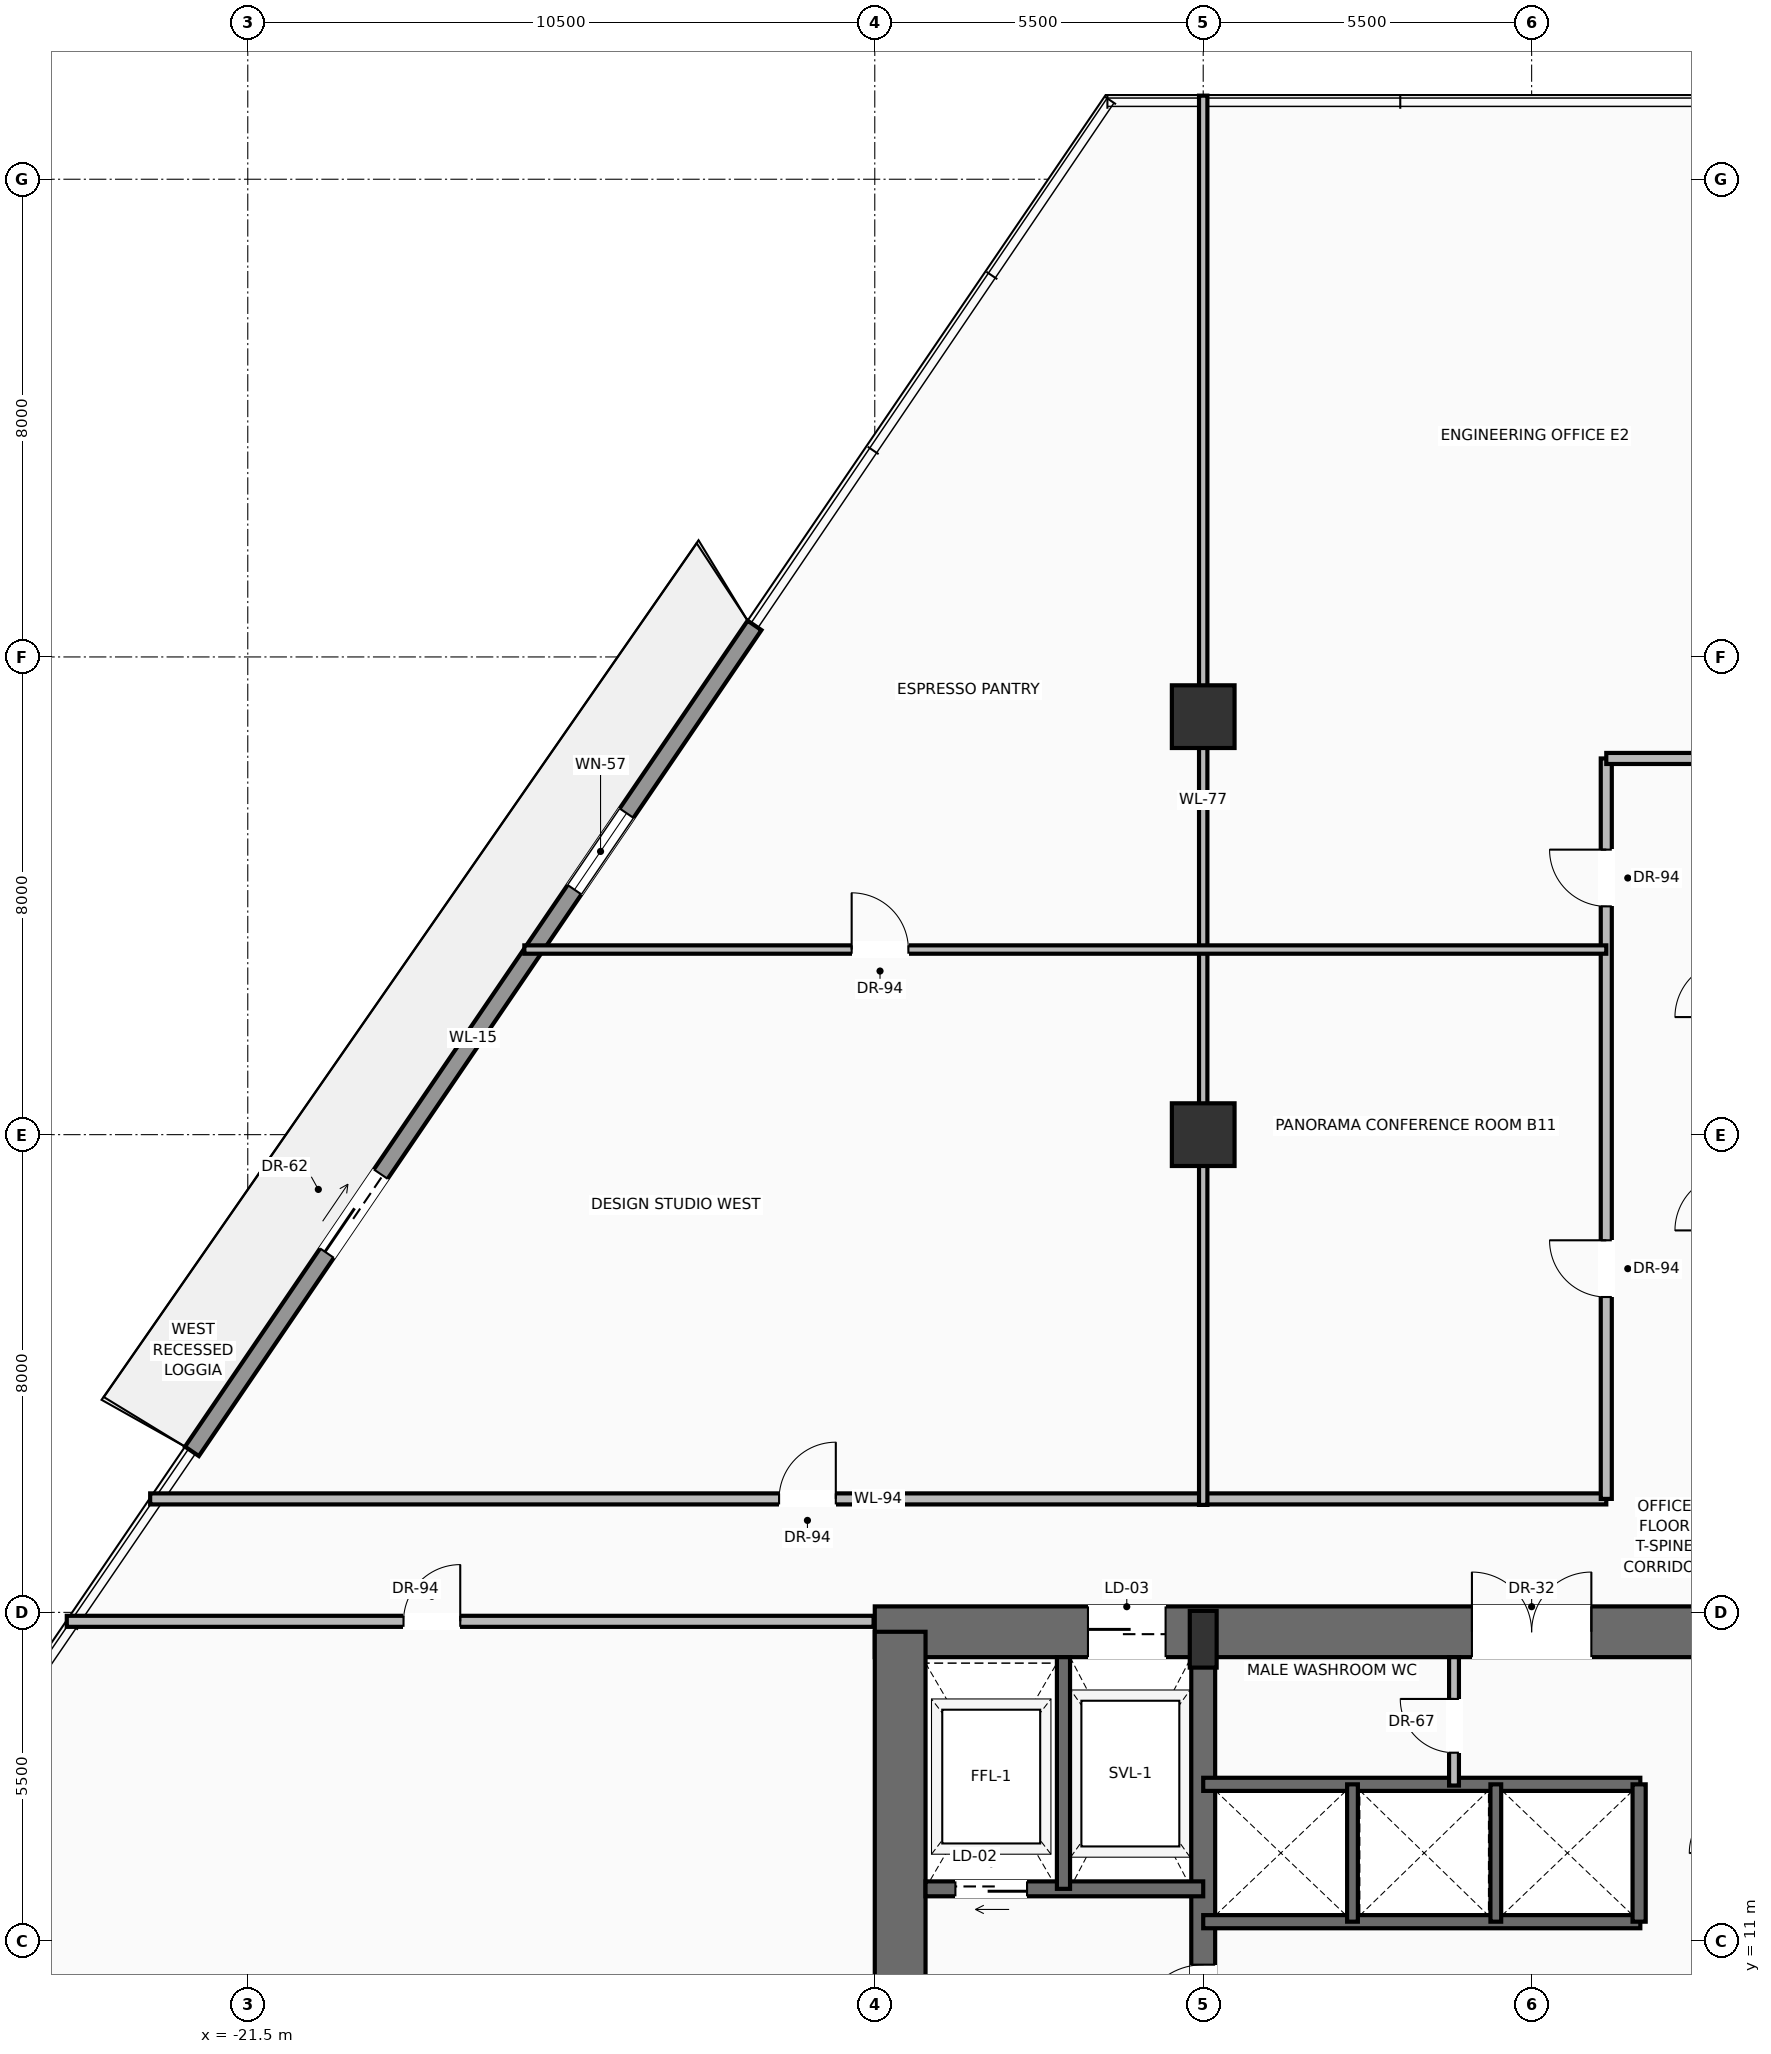
"""IFC4 building model, lengths in metres.
Left out: names, types, materials, properties, quantities, classifications, styles, units other than length and angle.
Written with IfcOpenShell. Run it as: python <this file> out.ifc"""

import sys

from ifc_helpers import new_model, si_unit, direction, frame, frame_2d, origin, origin_2d, place, context, subcontext, project, spatial, rectangle, extrude, source, transform, mapped, element, fill, save


model = new_model("IFC4")
c1 = context("Model", 3, precision=1e-05, world=origin(), true_north=direction((0.0, 1.0)))
c2 = subcontext(c1, "Body", "Model", "MODEL_VIEW")
j1 = project(units=[si_unit("LENGTHUNIT", "METRE"), si_unit("PLANEANGLEUNIT", "RADIAN")], contexts=[c1])
p1 = place(None, origin())
s1 = spatial("IfcSite", under=j1, at=p1, CompositionType="ELEMENT")
p2 = place(p1, origin())
s2 = spatial("IfcBuilding", under=s1, at=p2, CompositionType="ELEMENT")
p3 = place(p2, frame((0.0, 0.0, 49.7)))
s3 = spatial("IfcBuildingStorey", under=s2, at=p3, CompositionType="ELEMENT", Elevation=49.7)
p4 = place(p3, frame((-11.0, 16.175, 0.0), z_axis=(0.0, 0.0, 1.0), x_axis=(1.0, 0.0, 0.0)))
e1 = element("IfcWall", 1, at=p4, inside=s3, PredefinedType="SHEAR", context=c2, shape_type="SweptSolid", body=[
    extrude(rectangle(XDim=22.0, YDim=0.85, at=frame_2d((11.0, 0.0))), origin(), (0.0, 0.0, 1.0), 3.45),
])
p5 = place(p4, frame((3.57, 0.0, 0.0)))
e2 = element("IfcOpeningElement", 2, at=p5, cuts=e1, PredefinedType="OPENING", context=c2, shape_type="SweptSolid", body=[
    extrude(rectangle(XDim=1.3, YDim=2.3, at=frame_2d((0.65, 1.15))), frame((0.0, 0.435, 0.0), z_axis=(0.0, -1.0, 0.0), x_axis=(1.0, 0.0, 0.0)), (0.0, 0.0, 1.0), 0.87),
])
p6 = place(p4, frame((10.0, 0.0, 0.0)))
e3 = element("IfcOpeningElement", 3, at=p6, cuts=e1, PredefinedType="OPENING", context=c2, shape_type="SweptSolid", body=[
    extrude(rectangle(XDim=2.0, YDim=2.4, at=frame_2d((1.0, 1.2))), frame((0.0, 0.435, 0.0), z_axis=(0.0, -1.0, 0.0), x_axis=(1.0, 0.0, 0.0)), (0.0, 0.0, 1.0), 0.87),
])
p7 = place(p3, frame((-10.575, 0.425, 0.0), z_axis=(0.0, 0.0, 1.0), x_axis=(0.0, 1.0, 0.0)))
e4 = element("IfcWall", 4, at=p7, inside=s3, PredefinedType="SHEAR", context=c2, shape_type="SweptSolid", body=[
    extrude(rectangle(XDim=15.75, YDim=0.85, at=frame_2d((7.875, 0.0))), origin(), (0.0, 0.0, 1.0), 3.45),
])
p8 = place(p3, frame((-5.5, 0.425, 0.0), z_axis=(0.0, 0.0, 1.0), x_axis=(0.0, 1.0, 0.0)))
e5 = element("IfcWall", 5, at=p8, inside=s3, PredefinedType="SHEAR", context=c2, shape_type="SweptSolid", body=[
    extrude(rectangle(XDim=15.75, YDim=0.4, at=frame_2d((7.875, 0.0))), origin(), (0.0, 0.0, 1.0), 3.45),
])
p9 = place(p8, frame((9.075, 0.0, 0.0)))
e6 = element("IfcOpeningElement", 6, at=p9, cuts=e5, PredefinedType="OPENING", context=c2, shape_type="SweptSolid", body=[
    extrude(rectangle(XDim=1.1, YDim=2.2, at=frame_2d((0.55, 1.1))), frame((0.0, 0.21, 0.0), z_axis=(0.0, -1.0, 0.0), x_axis=(1.0, 0.0, 0.0)), (0.0, 0.0, 1.0), 0.42),
])
m1 = source(origin(), c2, "Body", "SweptSolid", [
    extrude(rectangle(XDim=0.45, YDim=0.95, at=origin_2d()), origin(), (0.0, 0.0, 1.0), 3.7),
])
p10 = place(p3, frame((-5.5, 16.05, 0.0), z_axis=(0.0, 0.0, 1.0), x_axis=(1.0, 0.0, 0.0)))
e7 = element("IfcColumn", 7, at=p10, inside=s3, PredefinedType="PILASTER", context=c2, shape_type="MappedRepresentation", body=[
    mapped(m1, transform((0.0, 0.0, 0.0), scale=1.0)),
])
m2 = source(origin(), c2, "Body", "SweptSolid", [
    extrude(rectangle(XDim=1.05, YDim=1.05, at=origin_2d()), origin(), (0.0, 0.0, 1.0), 3.7),
])
for number, where, z_axis, x_axis in (
    (8, (-5.5, 24.5, 0.0), (0.0, 0.0, 1.0), (1.0, 0.0, 0.0)),
    (9, (-5.5, 31.5, 0.0), (0.0, 0.0, 1.0), (1.0, 0.0, 0.0)),
):
    element("IfcColumn", number, at=place(p3, frame(where, z_axis=z_axis, x_axis=x_axis)), inside=s3, PredefinedType="COLUMN", context=c2, shape_type="MappedRepresentation", body=[
        mapped(m2, transform((0.0, 0.0, 0.0), scale=1.0)),
    ])
p11 = place(p3, frame((-22.435, 19.197, 0.0), z_axis=(0.0, 0.0, 1.0), x_axis=(0.562920759349, 0.826510870282, 0.0)))
e10 = element("IfcWall", 10, at=p11, inside=s3, PredefinedType="SOLIDWALL", context=c2, shape_type="SweptSolid", body=[
    extrude(rectangle(XDim=16.736, YDim=0.28, at=frame_2d((8.368, 0.0))), origin(), (0.0, 0.0, 1.0), 3.03),
])
p12 = place(p11, frame((4.017, 0.0, 0.0)))
e11 = element("IfcOpeningElement", 11, at=p12, cuts=e10, PredefinedType="OPENING", context=c2, shape_type="SweptSolid", body=[
    extrude(rectangle(XDim=1.6, YDim=2.35, at=frame_2d((0.8, 1.175))), frame((0.0, 0.15, 0.0), z_axis=(0.0, -1.0, 0.0), x_axis=(1.0, 0.0, 0.0)), (0.0, 0.0, 1.0), 0.3),
])
p13 = place(p11, frame((11.38, 0.0, 0.9)))
e12 = element("IfcOpeningElement", 12, at=p13, cuts=e10, PredefinedType="OPENING", context=c2, shape_type="SweptSolid", body=[
    extrude(rectangle(XDim=1.55, YDim=1.85, at=frame_2d((0.775, 0.925))), frame((0.0, 0.15, 0.0), z_axis=(0.0, -1.0, 0.0), x_axis=(1.0, 0.0, 0.0)), (0.0, 0.0, 1.0), 0.3),
])
p14 = place(p3, frame((-5.5, 11.87, 0.0), z_axis=(0.0, 0.0, 1.0), x_axis=(-1.0, 0.0, 0.0)))
e13 = element("IfcWall", 13, at=p14, inside=s3, PredefinedType="SOLIDWALL", context=c2, shape_type="SweptSolid", body=[
    extrude(rectangle(XDim=4.65, YDim=0.25, at=frame_2d((2.325, 0.0))), origin(), (0.0, 0.0, 1.0), 3.45),
])
p15 = place(p14, frame((2.95, 0.0, 0.0)))
e14 = element("IfcOpeningElement", 14, at=p15, cuts=e13, PredefinedType="OPENING", context=c2, shape_type="SweptSolid", body=[
    extrude(rectangle(XDim=1.2, YDim=2.25, at=frame_2d((0.6, 1.125))), frame((0.0, 0.135, 0.0), z_axis=(0.0, -1.0, 0.0), x_axis=(1.0, 0.0, 0.0)), (0.0, 0.0, 1.0), 0.27),
])
p16 = place(p3, frame((-7.84, 11.87, 0.0), z_axis=(0.0, 0.0, 1.0), x_axis=(0.0, 1.0, 0.0)))
e15 = element("IfcWall", 15, at=p16, inside=s3, PredefinedType="SOLIDWALL", context=c2, shape_type="SweptSolid", body=[
    extrude(rectangle(XDim=3.88, YDim=0.22, at=frame_2d((1.94, 0.0))), origin(), (0.0, 0.0, 1.0), 3.45),
])
for number, where, z_axis, x_axis in (
    (16, (-5.5, 11.32, 0.0), (0.0, 0.0, 1.0), (1.0, 0.0, 0.0)),
    (17, (-5.5, 13.62, 0.0), (0.0, 0.0, 1.0), (1.0, 0.0, 0.0)),
):
    element("IfcWall", number, at=place(p3, frame(where, z_axis=z_axis, x_axis=x_axis)), inside=s3, PredefinedType="SOLIDWALL", context=c2, shape_type="SweptSolid", body=[
        extrude(rectangle(XDim=7.32, YDim=0.22, at=frame_2d((3.66, 0.0))), origin(), (0.0, 0.0, 1.0), 3.45),
    ])
p17 = place(p3, frame((1.8, 11.32, 0.0), z_axis=(0.0, 0.0, 1.0), x_axis=(0.0, 1.0, 0.0)))
e18 = element("IfcWall", 18, at=p17, inside=s3, PredefinedType="SOLIDWALL", context=c2, shape_type="SweptSolid", body=[
    extrude(rectangle(XDim=2.3, YDim=0.22, at=frame_2d((1.15, 0.0))), origin(), (0.0, 0.0, 1.0), 3.45),
])
for number, where, z_axis, x_axis in (
    (19, (-3.0, 11.32, 0.0), (0.0, 0.0, 1.0), (0.0, 1.0, 0.0)),
    (20, (-0.6, 11.32, 0.0), (0.0, 0.0, 1.0), (0.0, 1.0, 0.0)),
):
    element("IfcWall", number, at=place(p3, frame(where, z_axis=z_axis, x_axis=x_axis)), inside=s3, PredefinedType="SOLIDWALL", context=c2, shape_type="SweptSolid", body=[
        extrude(rectangle(XDim=2.3, YDim=0.18, at=frame_2d((1.15, 0.0))), origin(), (0.0, 0.0, 1.0), 3.45),
    ])
p18 = place(p3, frame((-1.3, 13.6, 0.0), z_axis=(0.0, 0.0, 1.0), x_axis=(0.0, 1.0, 0.0)))
e21 = element("IfcWall", 21, at=p18, inside=s3, PredefinedType="PARTITIONING", context=c2, shape_type="SweptSolid", body=[
    extrude(rectangle(XDim=2.15, YDim=0.165, at=frame_2d((1.075, 0.0))), origin(), (0.0, 0.0, 1.0), 3.442),
])
p19 = place(p18, frame((0.55, 0.0, 0.0)))
e22 = element("IfcOpeningElement", 22, at=p19, cuts=e21, PredefinedType="OPENING", context=c2, shape_type="SweptSolid", body=[
    extrude(rectangle(XDim=0.9, YDim=2.1, at=frame_2d((0.45, 1.05))), frame((0.0, 0.093, 0.0), z_axis=(0.0, -1.0, 0.0), x_axis=(1.0, 0.0, 0.0)), (0.0, 0.0, 1.0), 0.185),
])
p20 = place(p3, frame((-24.531, 16.35, 0.0), z_axis=(0.0, 0.0, 1.0), x_axis=(1.0, 0.0, 0.0)))
e23 = element("IfcWall", 23, at=p20, inside=s3, PredefinedType="PARTITIONING", context=c2, shape_type="SweptSolid", body=[
    extrude(rectangle(XDim=13.511, YDim=0.185, at=frame_2d((6.755, 0.0))), origin(), (0.0, 0.0, 1.0), 2.747),
])
p21 = place(p20, frame((5.639, 0.0, 0.0)))
e24 = element("IfcOpeningElement", 24, at=p21, cuts=e23, PredefinedType="OPENING", context=c2, shape_type="SweptSolid", body=[
    extrude(rectangle(XDim=0.95, YDim=2.2, at=frame_2d((0.475, 1.1))), frame((0.0, 0.103, 0.0), z_axis=(0.0, -1.0, 0.0), x_axis=(1.0, 0.0, 0.0)), (0.0, 0.0, 1.0), 0.205),
])
p22 = place(p3, frame((-23.135, 18.4, 0.0), z_axis=(0.0, 0.0, 1.0), x_axis=(1.0, 0.0, 0.0)))
e25 = element("IfcWall", 25, at=p22, inside=s3, PredefinedType="PARTITIONING", context=c2, shape_type="SweptSolid", body=[
    extrude(rectangle(XDim=24.385, YDim=0.185, at=frame_2d((12.192, 0.0))), origin(), (0.0, 0.0, 1.0), 2.747),
])
p23 = place(p22, frame((10.532, 0.0, 0.0)))
e26 = element("IfcOpeningElement", 26, at=p23, cuts=e25, PredefinedType="OPENING", context=c2, shape_type="SweptSolid", body=[
    extrude(rectangle(XDim=0.95, YDim=2.2, at=frame_2d((0.475, 1.1))), frame((0.0, 0.103, 0.0), z_axis=(0.0, -1.0, 0.0), x_axis=(1.0, 0.0, 0.0)), (0.0, 0.0, 1.0), 0.205),
])
p24 = place(p3, frame((1.25, 18.4, 0.0), z_axis=(0.0, 0.0, 1.0), x_axis=(0.0, 1.0, 0.0)))
e27 = element("IfcWall", 27, at=p24, inside=s3, PredefinedType="PARTITIONING", context=c2, shape_type="SweptSolid", body=[
    extrude(rectangle(XDim=12.4, YDim=0.185, at=frame_2d((6.2, 0.0))), origin(), (0.0, 0.0, 1.0), 2.747),
])
p25 = place(p24, frame((3.381, 0.0, 0.0)))
e28 = element("IfcOpeningElement", 28, at=p25, cuts=e27, PredefinedType="OPENING", context=c2, shape_type="SweptSolid", body=[
    extrude(rectangle(XDim=0.95, YDim=2.2, at=frame_2d((0.475, 1.1))), frame((0.0, 0.103, 0.0), z_axis=(0.0, -1.0, 0.0), x_axis=(1.0, 0.0, 0.0)), (0.0, 0.0, 1.0), 0.205),
])
p26 = place(p24, frame((9.923, 0.0, 0.0)))
e29 = element("IfcOpeningElement", 29, at=p26, cuts=e27, PredefinedType="OPENING", context=c2, shape_type="SweptSolid", body=[
    extrude(rectangle(XDim=0.95, YDim=2.2, at=frame_2d((0.475, 1.1))), frame((0.0, 0.103, 0.0), z_axis=(0.0, -1.0, 0.0), x_axis=(1.0, 0.0, 0.0)), (0.0, 0.0, 1.0), 0.205),
])
p27 = place(p3, frame((1.25, 30.8, 0.0), z_axis=(0.0, 0.0, 1.0), x_axis=(1.0, 0.0, 0.0)))
e30 = element("IfcWall", 30, at=p27, inside=s3, PredefinedType="PARTITIONING", context=c2, shape_type="SweptSolid", body=[
    extrude(rectangle(XDim=2.1, YDim=0.185, at=frame_2d((1.05, 0.0))), origin(), (0.0, 0.0, 1.0), 3.442),
])
p28 = place(p3, frame((-5.5, 18.3, 0.0), z_axis=(0.0, 0.0, 1.0), x_axis=(0.0, 1.0, 0.0)))
e31 = element("IfcWall", 31, at=p28, inside=s3, PredefinedType="PARTITIONING", context=c2, shape_type="SweptSolid", body=[
    extrude(rectangle(XDim=23.6, YDim=0.14, at=frame_2d((11.8, 0.0))), origin(), (0.0, 0.0, 1.0), 2.747),
])
p29 = place(p3, frame((-16.869, 27.6, 0.0), z_axis=(0.0, 0.0, 1.0), x_axis=(1.0, 0.0, 0.0)))
e32 = element("IfcWall", 32, at=p29, inside=s3, PredefinedType="PARTITIONING", context=c2, shape_type="SweptSolid", body=[
    extrude(rectangle(XDim=18.119, YDim=0.14, at=frame_2d((9.059, 0.0))), origin(), (0.0, 0.0, 1.0), 2.747),
])
p30 = place(p29, frame((5.481, 0.0, 0.0)))
e33 = element("IfcOpeningElement", 33, at=p30, cuts=e32, PredefinedType="OPENING", context=c2, shape_type="SweptSolid", body=[
    extrude(rectangle(XDim=0.95, YDim=2.2, at=frame_2d((0.475, 1.1))), frame((0.0, 0.08, 0.0), z_axis=(0.0, -1.0, 0.0), x_axis=(1.0, 0.0, 0.0)), (0.0, 0.0, 1.0), 0.16),
])
m3 = source(origin(), c2, "Body", "SweptSolid", [
    extrude(rectangle(XDim=1.6, YDim=2.35, at=frame_2d((0.8, 1.175))), frame((0.0, 0.025, 0.0), z_axis=(0.0, -1.0, 0.0), x_axis=(1.0, 0.0, 0.0)), (0.0, 0.0, 1.0), 0.05),
])
p31 = place(p12, origin())
e34 = element("IfcDoor", 34, at=p31, inside=s3, OperationType="SLIDING_TO_LEFT", PredefinedType="DOOR", context=c2, shape_type="MappedRepresentation", body=[
    mapped(m3, transform((0.0, 0.0, 0.0), scale=1.0)),
])
fill(e11, e34)
m4 = source(origin(), c2, "Body", "SweptSolid", [
    extrude(rectangle(XDim=1.55, YDim=1.85, at=frame_2d((0.775, 0.925))), frame((0.0, 0.03, 0.0), z_axis=(0.0, -1.0, 0.0), x_axis=(1.0, 0.0, 0.0)), (0.0, 0.0, 1.0), 0.06),
])
p32 = place(p13, origin())
e35 = element("IfcWindow", 35, at=p32, inside=s3, PartitioningType="SINGLE_PANEL", PredefinedType="WINDOW", context=c2, shape_type="MappedRepresentation", body=[
    mapped(m4, transform((0.0, 0.0, 0.0), scale=1.0)),
])
fill(e12, e35)
m5 = source(origin(), c2, "Body", "SweptSolid", [
    extrude(rectangle(XDim=1.1, YDim=2.2, at=frame_2d((0.55, 1.1))), frame((0.0, 0.025, 0.0), z_axis=(0.0, -1.0, 0.0), x_axis=(1.0, 0.0, 0.0)), (0.0, 0.0, 1.0), 0.05),
])
p33 = place(p9, origin())
e36 = element("IfcDoor", 36, at=p33, inside=s3, OperationType="SINGLE_SWING_LEFT", PredefinedType="DOOR", context=c2, shape_type="MappedRepresentation", body=[
    mapped(m5, transform((0.0, 0.0, 0.0), scale=1.0)),
])
fill(e6, e36)
m6 = source(origin(), c2, "Body", "SweptSolid", [
    extrude(rectangle(XDim=1.2, YDim=2.25, at=frame_2d((0.6, 1.125))), frame((0.0, 0.025, 0.0), z_axis=(0.0, -1.0, 0.0), x_axis=(1.0, 0.0, 0.0)), (0.0, 0.0, 1.0), 0.05),
])
p34 = place(p15, origin())
e37 = element("IfcDoor", 37, at=p34, inside=s3, OperationType="SLIDING_TO_LEFT", PredefinedType="DOOR", context=c2, shape_type="MappedRepresentation", body=[
    mapped(m6, transform((0.0, 0.0, 0.0), scale=1.0)),
])
fill(e14, e37)
m7 = source(origin(), c2, "Body", "SweptSolid", [
    extrude(rectangle(XDim=1.3, YDim=2.3, at=frame_2d((0.65, 1.15))), frame((0.0, 0.025, 0.0), z_axis=(0.0, -1.0, 0.0), x_axis=(1.0, 0.0, 0.0)), (0.0, 0.0, 1.0), 0.05),
])
p35 = place(p5, origin())
e38 = element("IfcDoor", 38, at=p35, inside=s3, OperationType="SLIDING_TO_RIGHT", PredefinedType="DOOR", context=c2, shape_type="MappedRepresentation", body=[
    mapped(m7, transform((0.0, 0.0, 0.0), scale=1.0)),
])
fill(e2, e38)
m8 = source(origin(), c2, "Body", "SweptSolid", [
    extrude(rectangle(XDim=2.0, YDim=2.4, at=frame_2d((1.0, 1.2))), frame((0.0, 0.025, 0.0), z_axis=(0.0, -1.0, 0.0), x_axis=(1.0, 0.0, 0.0)), (0.0, 0.0, 1.0), 0.05),
])
p36 = place(p6, origin())
e39 = element("IfcDoor", 39, at=p36, inside=s3, OperationType="DOUBLE_DOOR_SINGLE_SWING", PredefinedType="DOOR", context=c2, shape_type="MappedRepresentation", body=[
    mapped(m8, transform((0.0, 0.0, 0.0), scale=1.0)),
])
fill(e3, e39)
m9 = source(origin(), c2, "Body", "SweptSolid", [
    extrude(rectangle(XDim=0.9, YDim=2.1, at=frame_2d((0.45, 1.05))), frame((0.0, 0.025, 0.0), z_axis=(0.0, -1.0, 0.0), x_axis=(1.0, 0.0, 0.0)), (0.0, 0.0, 1.0), 0.05),
])
p37 = place(p19, origin())
e40 = element("IfcDoor", 40, at=p37, inside=s3, OperationType="SINGLE_SWING_RIGHT", PredefinedType="DOOR", context=c2, shape_type="MappedRepresentation", body=[
    mapped(m9, transform((0.0, 0.0, 0.0), scale=1.0)),
])
fill(e22, e40)
m10 = source(origin(), c2, "Body", "SweptSolid", [
    extrude(rectangle(XDim=0.95, YDim=2.2, at=frame_2d((0.475, 1.1))), frame((0.0, 0.025, 0.0), z_axis=(0.0, -1.0, 0.0), x_axis=(1.0, 0.0, 0.0)), (0.0, 0.0, 1.0), 0.05),
])
p38 = place(p21, origin())
e41 = element("IfcDoor", 41, at=p38, inside=s3, OperationType="SINGLE_SWING_RIGHT", PredefinedType="DOOR", context=c2, shape_type="MappedRepresentation", body=[
    mapped(m10, transform((0.0, 0.0, 0.0), scale=1.0)),
])
fill(e24, e41)
p39 = place(p23, origin())
e42 = element("IfcDoor", 42, at=p39, inside=s3, OperationType="SINGLE_SWING_RIGHT", PredefinedType="DOOR", context=c2, shape_type="MappedRepresentation", body=[
    mapped(m10, transform((0.0, 0.0, 0.0), scale=1.0)),
])
fill(e26, e42)
p40 = place(p25, origin())
e43 = element("IfcDoor", 43, at=p40, inside=s3, OperationType="SINGLE_SWING_RIGHT", PredefinedType="DOOR", context=c2, shape_type="MappedRepresentation", body=[
    mapped(m10, transform((0.0, 0.0, 0.0), scale=1.0)),
])
fill(e28, e43)
p41 = place(p30, origin())
e44 = element("IfcDoor", 44, at=p41, inside=s3, OperationType="SINGLE_SWING_LEFT", PredefinedType="DOOR", context=c2, shape_type="MappedRepresentation", body=[
    mapped(m10, transform((0.0, 0.0, 0.0), scale=1.0)),
])
fill(e33, e44)
p42 = place(p26, origin())
e45 = element("IfcDoor", 45, at=p42, inside=s3, OperationType="SINGLE_SWING_RIGHT", PredefinedType="DOOR", context=c2, shape_type="MappedRepresentation", body=[
    mapped(m10, transform((0.0, 0.0, 0.0), scale=1.0)),
])
fill(e29, e45)
save(model, sys.argv[1])
